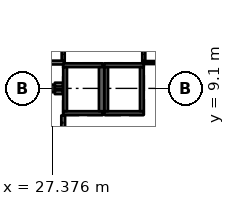
"""IFC4 building model, lengths in metres.
Left out: names, types, materials, properties, quantities, classifications, styles, units other than length and angle.
Written with IfcOpenShell. Run it as: python <this file> out.ifc"""

import sys

from ifc_helpers import new_model, si_unit, direction, frame, frame_2d, origin, origin_2d, place, context, subcontext, project, spatial, rectangle, extrude, element, fill, save


model = new_model("IFC4")
c1 = context("Model", 3, precision=1e-05, world=origin(), true_north=direction((0.0, 1.0)))
c2 = subcontext(c1, "Body", "Model", "MODEL_VIEW")
j1 = project(units=[si_unit("LENGTHUNIT", "METRE"), si_unit("PLANEANGLEUNIT", "RADIAN")], contexts=[c1])
p1 = place(None, origin())
s1 = spatial("IfcSite", under=j1, at=p1, CompositionType="ELEMENT")
p2 = place(p1, origin())
s2 = spatial("IfcBuilding", under=s1, at=p2, CompositionType="ELEMENT")
p3 = place(p2, frame((0.0, 0.0, 24.57)))
s3 = spatial("IfcBuildingStorey", under=s2, at=p3, CompositionType="ELEMENT", Elevation=24.57)
p4 = place(p3, frame((27.3, 9.1, 0.0), z_axis=(0.0, 0.0, 1.0), x_axis=(1.0, 0.0, 0.0)))
e1 = element("IfcColumn", 1, at=p4, inside=s3, PredefinedType="COLUMN", context=c2, shape_type="SweptSolid", body=[
    extrude(rectangle(XDim=0.5, YDim=0.5, at=origin_2d()), origin(), (0.0, 0.0, 1.0), 4.55),
])
p5 = place(p3, frame((30.7, 7.475, 0.0), z_axis=(0.0, 0.0, 1.0), x_axis=(-1.0, 0.0, 0.0)))
e2 = element("IfcWall", 2, at=p5, inside=s3, PredefinedType="SHEAR", context=c2, shape_type="SweptSolid", body=[
    extrude(rectangle(XDim=2.6, YDim=0.25, at=frame_2d((1.3, 0.0))), origin(), (0.0, 0.0, 1.0), 4.55),
])
p6 = place(p3, frame((30.7, 10.625, 0.0), z_axis=(0.0, 0.0, 1.0), x_axis=(-1.0, 0.0, 0.0)))
e3 = element("IfcWall", 3, at=p6, inside=s3, PredefinedType="SHEAR", context=c2, shape_type="SweptSolid", body=[
    extrude(rectangle(XDim=2.6, YDim=0.25, at=frame_2d((1.3, 0.0))), origin(), (0.0, 0.0, 1.0), 4.55),
])
p7 = place(p6, frame((0.8, 0.0, 0.0)))
e4 = element("IfcOpeningElement", 4, at=p7, cuts=e3, PredefinedType="OPENING", context=c2, shape_type="SweptSolid", body=[
    extrude(rectangle(XDim=1.0, YDim=2.1, at=frame_2d((0.5, 1.05))), frame((0.0, 0.135, 0.0), z_axis=(0.0, -1.0, 0.0), x_axis=(1.0, 0.0, 0.0)), (0.0, 0.0, 1.0), 0.27),
])
p8 = place(p3, frame((28.225, 10.5, 0.0), z_axis=(0.0, 0.0, 1.0), x_axis=(0.0, -1.0, 0.0)))
e5 = element("IfcWall", 5, at=p8, inside=s3, PredefinedType="SHEAR", context=c2, shape_type="SweptSolid", body=[
    extrude(rectangle(XDim=2.9, YDim=0.25, at=frame_2d((1.45, 0.0))), origin(), (0.0, 0.0, 1.0), 4.55),
])
p9 = place(p3, frame((30.625, 10.5, 0.0), z_axis=(0.0, 0.0, 1.0), x_axis=(0.0, -1.0, 0.0)))
e6 = element("IfcWall", 6, at=p9, inside=s3, PredefinedType="SHEAR", context=c2, shape_type="SweptSolid", body=[
    extrude(rectangle(XDim=2.9, YDim=0.35, at=frame_2d((1.45, 0.0))), origin(), (0.0, 0.0, 1.0), 4.55),
])
p10 = place(p3, frame((33.4, 7.475, 0.0), z_axis=(0.0, 0.0, 1.0), x_axis=(-1.0, 0.0, 0.0)))
e7 = element("IfcWall", 7, at=p10, inside=s3, PredefinedType="SHEAR", context=c2, shape_type="SweptSolid", body=[
    extrude(rectangle(XDim=2.6, YDim=0.25, at=frame_2d((1.3, 0.0))), origin(), (0.0, 0.0, 1.0), 4.55),
])
p11 = place(p3, frame((33.4, 10.625, 0.0), z_axis=(0.0, 0.0, 1.0), x_axis=(-1.0, 0.0, 0.0)))
e8 = element("IfcWall", 8, at=p11, inside=s3, PredefinedType="SHEAR", context=c2, shape_type="SweptSolid", body=[
    extrude(rectangle(XDim=2.6, YDim=0.25, at=frame_2d((1.3, 0.0))), origin(), (0.0, 0.0, 1.0), 4.55),
])
p12 = place(p11, frame((0.8, 0.0, 0.0)))
e9 = element("IfcOpeningElement", 9, at=p12, cuts=e8, PredefinedType="OPENING", context=c2, shape_type="SweptSolid", body=[
    extrude(rectangle(XDim=1.0, YDim=2.1, at=frame_2d((0.5, 1.05))), frame((0.0, 0.135, 0.0), z_axis=(0.0, -1.0, 0.0), x_axis=(1.0, 0.0, 0.0)), (0.0, 0.0, 1.0), 0.27),
])
for number, where, z_axis, x_axis in (
    (10, (30.925, 10.5, 0.0), (0.0, 0.0, 1.0), (0.0, -1.0, 0.0)),
    (11, (33.275, 10.5, 0.0), (0.0, 0.0, 1.0), (0.0, -1.0, 0.0)),
):
    element("IfcWall", number, at=place(p3, frame(where, z_axis=z_axis, x_axis=x_axis)), inside=s3, PredefinedType="SHEAR", context=c2, shape_type="SweptSolid", body=[
        extrude(rectangle(XDim=2.9, YDim=0.25, at=frame_2d((1.45, 0.0))), origin(), (0.0, 0.0, 1.0), 4.55),
    ])
for number, where, z_axis, x_axis in (
    (12, (27.55, 8.85, 0.0), (0.0, 0.0, 1.0), (1.0, 0.0, 0.0)),
    (13, (28.07, 9.35, 0.0), (0.0, 0.0, 1.0), (-1.0, 0.0, 0.0)),
):
    element("IfcWall", number, at=place(p3, frame(where, z_axis=z_axis, x_axis=x_axis)), inside=s3, PredefinedType="SOLIDWALL", context=c2, shape_type="SweptSolid", body=[
        extrude(rectangle(XDim=0.52, YDim=0.25, at=frame_2d((0.26, 0.0))), origin(), (0.0, 0.0, 1.0), 4.35),
    ])
p13 = place(p3, frame((28.1, 7.32, 0.0), z_axis=(0.0, 0.0, 1.0), x_axis=(0.0, -1.0, 0.0)))
e14 = element("IfcWall", 14, at=p13, inside=s3, PredefinedType="SOLIDWALL", context=c2, shape_type="SweptSolid", body=[
    extrude(rectangle(XDim=6.495, YDim=0.25, at=frame_2d((3.248, 0.0))), origin(), (0.0, 0.0, 1.0), 4.35),
])
p14 = place(p3, frame((28.1, 13.7, 0.0), z_axis=(0.0, 0.0, 1.0), x_axis=(0.0, -1.0, 0.0)))
e15 = element("IfcWall", 15, at=p14, inside=s3, PredefinedType="PARTITIONING", context=c2, shape_type="SweptSolid", body=[
    extrude(rectangle(XDim=2.775, YDim=0.2, at=frame_2d((1.387, 0.0))), origin(), (0.0, 0.0, 1.0), 4.35),
])
p15 = place(p14, frame((0.45, 0.0, 0.0)))
e16 = element("IfcOpeningElement", 16, at=p15, cuts=e15, PredefinedType="OPENING", context=c2, shape_type="SweptSolid", body=[
    extrude(rectangle(XDim=1.8, YDim=2.4, at=frame_2d((0.9, 1.2))), frame((0.0, 0.11, 0.0), z_axis=(0.0, -1.0, 0.0), x_axis=(1.0, 0.0, 0.0)), (0.0, 0.0, 1.0), 0.22),
])
p16 = place(p3, frame((28.2, 10.8, 0.0), z_axis=(0.0, 0.0, 1.0), x_axis=(-1.0, 0.0, 0.0)))
e17 = element("IfcWall", 17, at=p16, inside=s3, PredefinedType="SOLIDWALL", context=c2, shape_type="SweptSolid", body=[
    extrude(rectangle(XDim=3.87, YDim=0.25, at=frame_2d((1.935, 0.0))), origin(), (0.0, 0.0, 1.0), 4.35),
])
p17 = place(p16, frame((1.45, 0.0, 0.0)))
e18 = element("IfcOpeningElement", 18, at=p17, cuts=e17, PredefinedType="OPENING", context=c2, shape_type="SweptSolid", body=[
    extrude(rectangle(XDim=1.0, YDim=2.1, at=frame_2d((0.5, 1.05))), frame((0.0, 0.135, 0.0), z_axis=(0.0, -1.0, 0.0), x_axis=(1.0, 0.0, 0.0)), (0.0, 0.0, 1.0), 0.27),
])
p18 = place(p3, frame((33.4, 10.9, 0.0), z_axis=(0.0, 0.0, 1.0), x_axis=(0.0, 1.0, 0.0)))
e19 = element("IfcWall", 19, at=p18, inside=s3, PredefinedType="PARTITIONING", context=c2, shape_type="SweptSolid", body=[
    extrude(rectangle(XDim=2.8, YDim=0.2, at=frame_2d((1.4, 0.0))), origin(), (0.0, 0.0, 1.0), 4.35),
])
p19 = place(p18, frame((0.55, 0.0, 0.0)))
e20 = element("IfcOpeningElement", 20, at=p19, cuts=e19, PredefinedType="OPENING", context=c2, shape_type="SweptSolid", body=[
    extrude(rectangle(XDim=1.8, YDim=2.4, at=frame_2d((0.9, 1.2))), frame((0.0, 0.11, 0.0), z_axis=(0.0, -1.0, 0.0), x_axis=(1.0, 0.0, 0.0)), (0.0, 0.0, 1.0), 0.22),
])
p20 = place(p3, frame((36.25, 10.8, 0.0), z_axis=(0.0, 0.0, 1.0), x_axis=(-1.0, 0.0, 0.0)))
e21 = element("IfcWall", 21, at=p20, inside=s3, PredefinedType="PARTITIONING", context=c2, shape_type="SweptSolid", body=[
    extrude(rectangle(XDim=2.95, YDim=0.2, at=frame_2d((1.475, 0.0))), origin(), (0.0, 0.0, 1.0), 4.35),
])
p21 = place(p20, frame((0.55, 0.0, 0.0)))
e22 = element("IfcOpeningElement", 22, at=p21, cuts=e21, PredefinedType="OPENING", context=c2, shape_type="SweptSolid", body=[
    extrude(rectangle(XDim=1.8, YDim=2.4, at=frame_2d((0.9, 1.2))), frame((0.0, 0.11, 0.0), z_axis=(0.0, -1.0, 0.0), x_axis=(1.0, 0.0, 0.0)), (0.0, 0.0, 1.0), 0.22),
])
p22 = place(p19, origin())
e23 = element("IfcDoor", 23, at=p22, inside=s3, OperationType="DOUBLE_DOOR_SINGLE_SWING", PredefinedType="DOOR", context=c2, shape_type="SweptSolid", body=[
    extrude(rectangle(XDim=1.8, YDim=2.4, at=frame_2d((0.9, 1.2))), frame((0.0, 0.025, 0.0), z_axis=(0.0, -1.0, 0.0), x_axis=(1.0, 0.0, 0.0)), (0.0, 0.0, 1.0), 0.05),
])
fill(e20, e23)
p23 = place(p15, origin())
e24 = element("IfcDoor", 24, at=p23, inside=s3, OperationType="DOUBLE_DOOR_SINGLE_SWING", PredefinedType="DOOR", context=c2, shape_type="SweptSolid", body=[
    extrude(rectangle(XDim=1.8, YDim=2.4, at=frame_2d((0.9, 1.2))), frame((0.0, 0.025, 0.0), z_axis=(0.0, -1.0, 0.0), x_axis=(1.0, 0.0, 0.0)), (0.0, 0.0, 1.0), 0.05),
])
fill(e16, e24)
p24 = place(p21, origin())
e25 = element("IfcDoor", 25, at=p24, inside=s3, OperationType="DOUBLE_DOOR_SINGLE_SWING", PredefinedType="DOOR", context=c2, shape_type="SweptSolid", body=[
    extrude(rectangle(XDim=1.8, YDim=2.4, at=frame_2d((0.9, 1.2))), frame((0.0, 0.025, 0.0), z_axis=(0.0, -1.0, 0.0), x_axis=(1.0, 0.0, 0.0)), (0.0, 0.0, 1.0), 0.05),
])
fill(e22, e25)
p25 = place(p7, origin())
e26 = element("IfcDoor", 26, at=p25, inside=s3, OperationType="DOUBLE_DOOR_SLIDING", PredefinedType="DOOR", context=c2, shape_type="SweptSolid", body=[
    extrude(rectangle(XDim=1.0, YDim=2.1, at=frame_2d((0.5, 1.05))), frame((0.0, 0.025, 0.0), z_axis=(0.0, -1.0, 0.0), x_axis=(1.0, 0.0, 0.0)), (0.0, 0.0, 1.0), 0.05),
])
fill(e4, e26)
p26 = place(p12, origin())
e27 = element("IfcDoor", 27, at=p26, inside=s3, OperationType="DOUBLE_DOOR_SLIDING", PredefinedType="DOOR", context=c2, shape_type="SweptSolid", body=[
    extrude(rectangle(XDim=1.0, YDim=2.1, at=frame_2d((0.5, 1.05))), frame((0.0, 0.025, 0.0), z_axis=(0.0, -1.0, 0.0), x_axis=(1.0, 0.0, 0.0)), (0.0, 0.0, 1.0), 0.05),
])
fill(e9, e27)
save(model, sys.argv[1])
